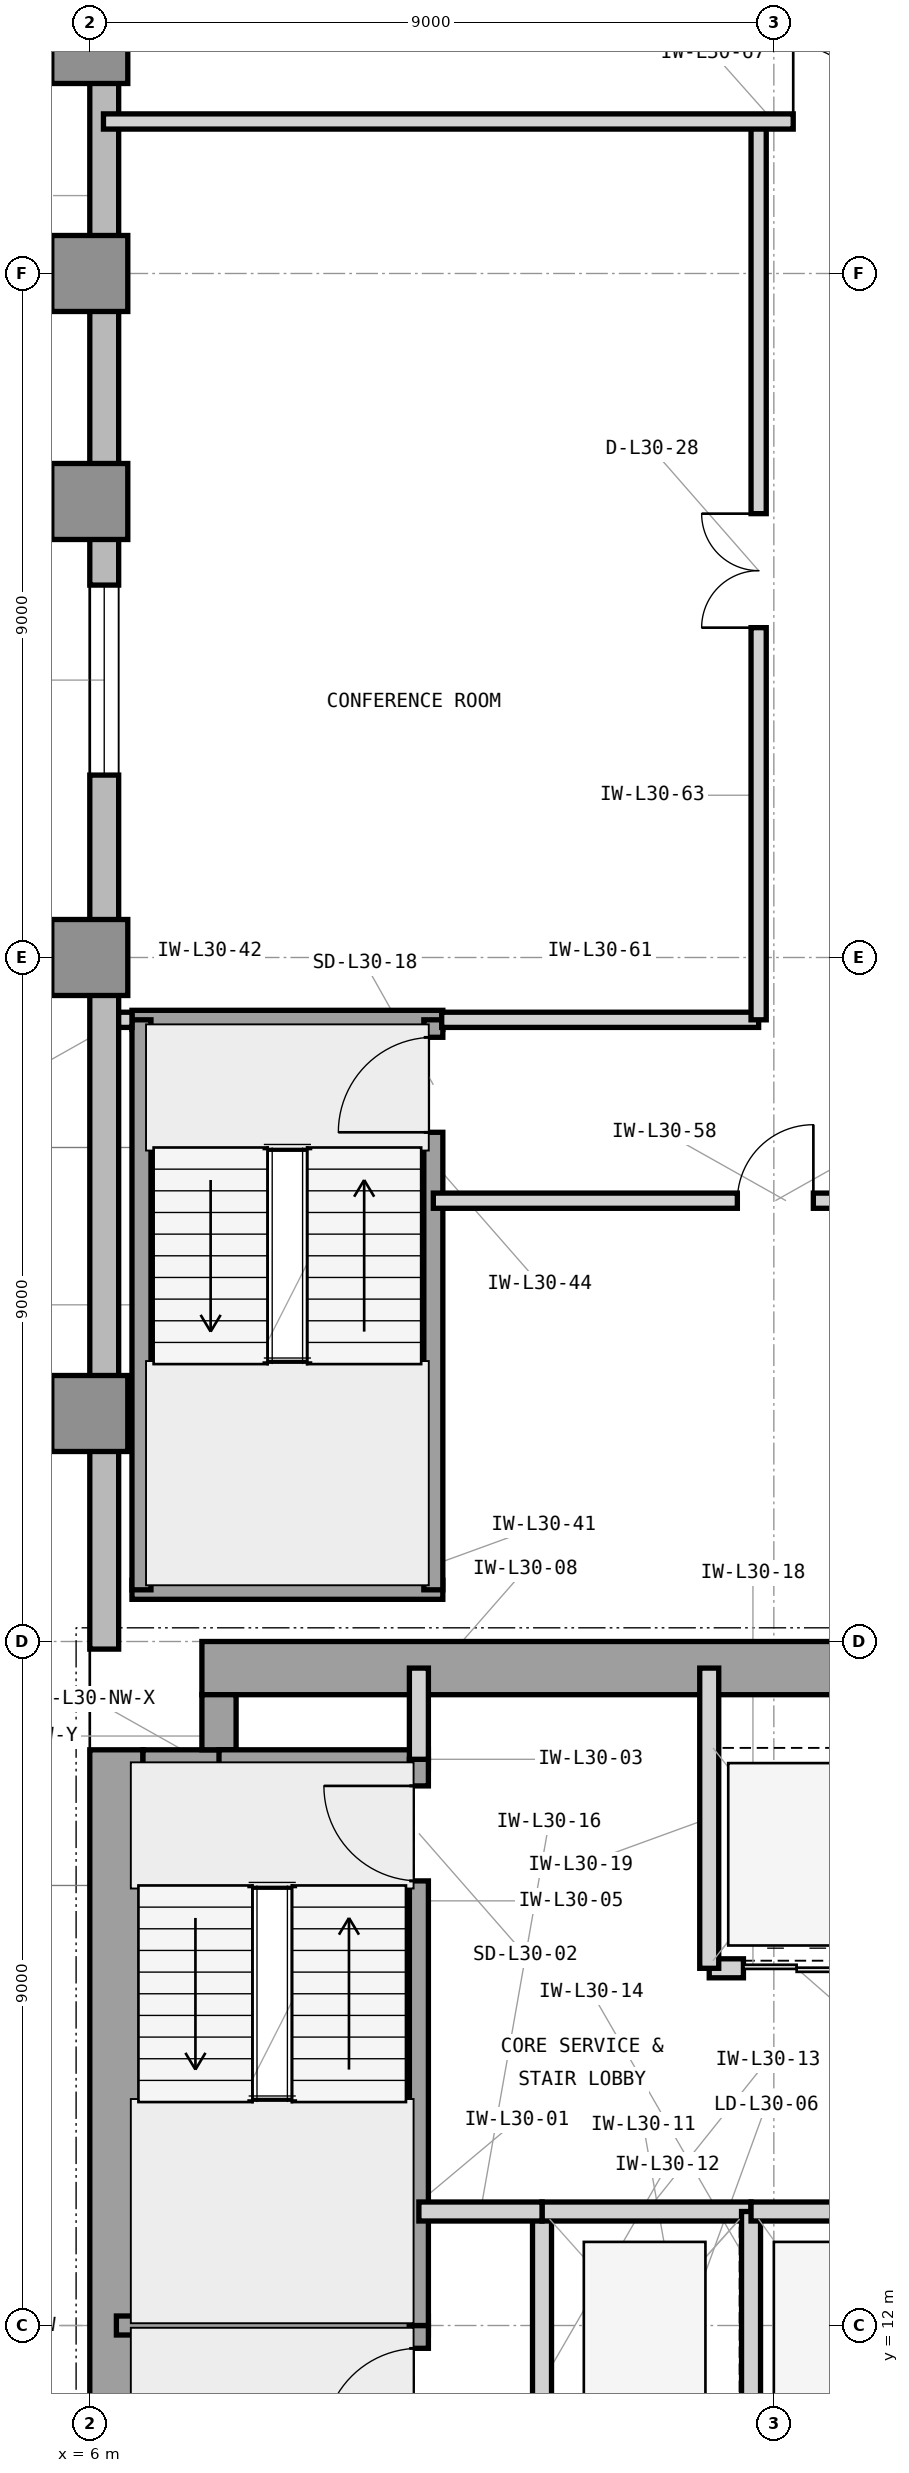
"""IFC4 building model, lengths in metres.
Left out: names, types, materials, properties, quantities, classifications, styles, units other than length and angle.
Written with IfcOpenShell. Run it as: python <this file> out.ifc"""

import sys

from ifc_helpers import new_model, si_unit, direction, frame, frame_2d, origin, origin_2d, place, context, subcontext, project, spatial, rectangle, extrude, element, fill, save


model = new_model("IFC4")
c1 = context("Model", 3, precision=1e-05, world=origin(), true_north=direction((0.0, 1.0)))
c2 = subcontext(c1, "Body", "Model", "MODEL_VIEW")
j1 = project(units=[si_unit("LENGTHUNIT", "METRE"), si_unit("PLANEANGLEUNIT", "RADIAN")], contexts=[c1])
p1 = place(None, origin())
s1 = spatial("IfcSite", under=j1, at=p1, CompositionType="ELEMENT")
p2 = place(p1, origin())
s2 = spatial("IfcBuilding", under=s1, at=p2, CompositionType="ELEMENT")
p3 = place(p2, frame((0.0, 0.0, 128.4)))
s3 = spatial("IfcBuildingStorey", under=s2, at=p3, CompositionType="ELEMENT", Elevation=128.4)
p4 = place(p3, frame((6.35, 4.425, 0.0), z_axis=(0.0, 0.0, 1.0), x_axis=(0.0, 1.0, 0.0)))
e1 = element("IfcWall", 1, at=p4, inside=s3, PredefinedType="SHEAR", context=c2, shape_type="SweptSolid", body=[
    extrude(rectangle(XDim=15.15, YDim=0.7, at=frame_2d((7.575, 0.0))), origin(), (0.0, 0.0, 1.0), 3.9),
])
p5 = place(p3, frame((7.475, 20.65, 0.0), z_axis=(0.0, 0.0, 1.0), x_axis=(1.0, 0.0, 0.0)))
e2 = element("IfcWall", 2, at=p5, inside=s3, PredefinedType="SHEAR", context=c2, shape_type="SweptSolid", body=[
    extrude(rectangle(XDim=12.325, YDim=0.7, at=frame_2d((6.163, 0.0))), origin(), (0.0, 0.0, 1.0), 3.9),
])
p6 = place(p3, frame((6.7, 19.35, 0.0), z_axis=(0.0, 0.0, 1.0), x_axis=(1.0, 0.0, 0.0)))
e3 = element("IfcWall", 3, at=p6, inside=s3, PredefinedType="SHEAR", context=c2, shape_type="SweptSolid", body=[
    extrude(rectangle(XDim=1.225, YDim=0.45, at=frame_2d((0.613, 0.0))), origin(), (0.0, 0.0, 1.0), 3.9),
])
p7 = place(p3, frame((7.7, 19.575, 0.0), z_axis=(0.0, 0.0, 1.0), x_axis=(0.0, 1.0, 0.0)))
e4 = element("IfcWall", 4, at=p7, inside=s3, PredefinedType="SHEAR", context=c2, shape_type="SweptSolid", body=[
    extrude(rectangle(XDim=0.725, YDim=0.45, at=frame_2d((0.363, 0.0))), origin(), (0.0, 0.0, 1.0), 3.9),
])
for number, where, z_axis, x_axis in (
    (5, (6.0, 24.0, 0.0), (0.0, 0.0, 1.0), (1.0, 0.0, 0.0)),
    (6, (6.0, 30.0, 0.0), (0.0, 0.0, 1.0), (1.0, 0.0, 0.0)),
    (7, (6.0, 36.0, 0.0), (0.0, 0.0, 1.0), (1.0, 0.0, 0.0)),
    (8, (6.0, 39.0, 0.0), (0.0, 0.0, 1.0), (1.0, 0.0, 0.0)),
    (9, (6.0, 42.0, 0.0), (0.0, 0.0, 1.0), (1.0, 0.0, 0.0)),
):
    element("IfcColumn", number, at=place(p3, frame(where, z_axis=z_axis, x_axis=x_axis)), inside=s3, PredefinedType="COLUMN", context=c2, shape_type="SweptSolid", body=[
        extrude(rectangle(XDim=1.0, YDim=1.0, at=origin_2d()), origin(), (0.0, 0.0, 1.0), 3.9),
    ])
p8 = place(p3, frame((6.19, 46.4, 0.0), z_axis=(0.0, 0.0, 1.0), x_axis=(0.0, -1.0, 0.0)))
e10 = element("IfcWall", 10, at=p8, inside=s3, PredefinedType="STANDARD", context=c2, shape_type="SweptSolid", body=[
    extrude(rectangle(XDim=25.5, YDim=0.38, at=frame_2d((12.75, 0.0))), origin(), (0.0, 0.0, 1.0), 3.7),
])
p9 = place(p8, frame((11.5, 0.0, 0.85)))
e11 = element("IfcOpeningElement", 11, at=p9, cuts=e10, PredefinedType="OPENING", context=c2, shape_type="SweptSolid", body=[
    extrude(rectangle(XDim=2.5, YDim=2.25, at=frame_2d((1.25, 1.125))), frame((0.0, 0.2, 0.0), z_axis=(0.0, -1.0, 0.0), x_axis=(1.0, 0.0, 0.0)), (0.0, 0.0, 1.0), 0.4),
])
p10 = place(p3, frame((6.35, 12.0, 0.0), z_axis=(0.0, 0.0, 1.0), x_axis=(1.0, 0.0, 0.0)))
e12 = element("IfcWall", 12, at=p10, inside=s3, PredefinedType="SHEAR", context=c2, shape_type="SweptSolid", body=[
    extrude(rectangle(XDim=4.105, YDim=0.25, at=frame_2d((2.052, 0.0))), origin(), (0.0, 0.0, 1.0), 3.9),
])
p11 = place(p3, frame((7.7, 19.45, 0.0), z_axis=(0.0, 0.0, 1.0), x_axis=(1.0, 0.0, 0.0)))
e13 = element("IfcWall", 13, at=p11, inside=s3, PredefinedType="SHEAR", context=c2, shape_type="SweptSolid", body=[
    extrude(rectangle(XDim=2.755, YDim=0.25, at=frame_2d((1.377, 0.0))), origin(), (0.0, 0.0, 1.0), 3.9),
])
p12 = place(p3, frame((10.33, 4.55, 0.0), z_axis=(0.0, 0.0, 1.0), x_axis=(0.0, 1.0, 0.0)))
e14 = element("IfcWall", 14, at=p12, inside=s3, PredefinedType="SHEAR", context=c2, shape_type="SweptSolid", body=[
    extrude(rectangle(XDim=7.45, YDim=0.25, at=frame_2d((3.725, 0.0))), origin(), (0.0, 0.0, 1.0), 3.9),
])
p13 = place(p12, frame((5.9, 0.0, 0.0)))
e15 = element("IfcOpeningElement", 15, at=p13, cuts=e14, PredefinedType="OPENING", context=c2, shape_type="SweptSolid", body=[
    extrude(rectangle(XDim=1.25, YDim=2.2, at=frame_2d((0.625, 1.1))), frame((0.0, 0.135, 0.0), z_axis=(0.0, -1.0, 0.0), x_axis=(1.0, 0.0, 0.0)), (0.0, 0.0, 1.0), 0.27),
])
p14 = place(p3, frame((10.33, 12.0, 0.0), z_axis=(0.0, 0.0, 1.0), x_axis=(0.0, 1.0, 0.0)))
e16 = element("IfcWall", 16, at=p14, inside=s3, PredefinedType="SHEAR", context=c2, shape_type="SweptSolid", body=[
    extrude(rectangle(XDim=7.45, YDim=0.25, at=frame_2d((3.725, 0.0))), origin(), (0.0, 0.0, 1.0), 3.9),
])
p15 = place(p14, frame((5.85, 0.0, 0.0)))
e17 = element("IfcOpeningElement", 17, at=p15, cuts=e16, PredefinedType="OPENING", context=c2, shape_type="SweptSolid", body=[
    extrude(rectangle(XDim=1.25, YDim=2.2, at=frame_2d((0.625, 1.1))), frame((0.0, 0.135, 0.0), z_axis=(0.0, -1.0, 0.0), x_axis=(1.0, 0.0, 0.0)), (0.0, 0.0, 1.0), 0.27),
])
p16 = place(p3, frame((10.33, 19.45, 0.0), z_axis=(0.0, 0.0, 1.0), x_axis=(0.0, 1.0, 0.0)))
e18 = element("IfcWall", 18, at=p16, inside=s3, PredefinedType="PARTITIONING", context=c2, shape_type="SweptSolid", body=[
    extrude(rectangle(XDim=1.2, YDim=0.25, at=frame_2d((0.6, 0.0))), origin(), (0.0, 0.0, 1.0), 2.994),
])
p17 = place(p3, frame((11.95, 10.5, 0.0), z_axis=(0.0, 0.0, 1.0), x_axis=(0.0, 1.0, 0.0)))
e19 = element("IfcWall", 19, at=p17, inside=s3, PredefinedType="PARTITIONING", context=c2, shape_type="SweptSolid", body=[
    extrude(rectangle(XDim=3.0, YDim=0.25, at=frame_2d((1.5, 0.0))), origin(), (0.0, 0.0, 1.0), 3.69),
])
p18 = place(p3, frame((11.95, 13.5, 0.0), z_axis=(0.0, 0.0, 1.0), x_axis=(1.0, 0.0, 0.0)))
e20 = element("IfcWall", 20, at=p18, inside=s3, PredefinedType="PARTITIONING", context=c2, shape_type="SweptSolid", body=[
    extrude(rectangle(XDim=2.75, YDim=0.25, at=frame_2d((1.375, 0.0))), origin(), (0.0, 0.0, 1.0), 3.233),
])
p19 = place(p3, frame((14.7, 10.5, 0.0), z_axis=(0.0, 0.0, 1.0), x_axis=(0.0, 1.0, 0.0)))
e21 = element("IfcWall", 21, at=p19, inside=s3, PredefinedType="PARTITIONING", context=c2, shape_type="SweptSolid", body=[
    extrude(rectangle(XDim=3.0, YDim=0.25, at=frame_2d((1.5, 0.0))), origin(), (0.0, 0.0, 1.0), 3.69),
])
p20 = place(p3, frame((10.33, 13.5, 0.0), z_axis=(0.0, 0.0, 1.0), x_axis=(1.0, 0.0, 0.0)))
e22 = element("IfcWall", 22, at=p20, inside=s3, PredefinedType="PARTITIONING", context=c2, shape_type="SweptSolid", body=[
    extrude(rectangle(XDim=1.62, YDim=0.25, at=frame_2d((0.81, 0.0))), origin(), (0.0, 0.0, 1.0), 3.233),
])
p21 = place(p3, frame((14.15, 16.7, 0.0), z_axis=(0.0, 0.0, 1.0), x_axis=(1.0, 0.0, 0.0)))
e23 = element("IfcWall", 23, at=p21, inside=s3, PredefinedType="PARTITIONING", context=c2, shape_type="SweptSolid", body=[
    extrude(rectangle(XDim=2.3, YDim=0.25, at=frame_2d((1.15, 0.0))), origin(), (0.0, 0.0, 1.0), 3.233),
])
p22 = place(p21, frame((0.45, 0.0, 0.0)))
e24 = element("IfcOpeningElement", 24, at=p22, cuts=e23, PredefinedType="OPENING", context=c2, shape_type="SweptSolid", body=[
    extrude(rectangle(XDim=1.4, YDim=2.35, at=frame_2d((0.7, 1.175))), frame((0.0, 0.135, 0.0), z_axis=(0.0, -1.0, 0.0), x_axis=(1.0, 0.0, 0.0)), (0.0, 0.0, 1.0), 0.27),
])
p23 = place(p3, frame((14.15, 16.7, 0.0), z_axis=(0.0, 0.0, 1.0), x_axis=(0.0, 1.0, 0.0)))
e25 = element("IfcWall", 25, at=p23, inside=s3, PredefinedType="PARTITIONING", context=c2, shape_type="SweptSolid", body=[
    extrude(rectangle(XDim=3.95, YDim=0.25, at=frame_2d((1.975, 0.0))), origin(), (0.0, 0.0, 1.0), 3.69),
])
p24 = place(p3, frame((14.7, 13.5, 0.0), z_axis=(0.0, 0.0, 1.0), x_axis=(1.0, 0.0, 0.0)))
e26 = element("IfcWall", 26, at=p24, inside=s3, PredefinedType="PARTITIONING", context=c2, shape_type="SweptSolid", body=[
    extrude(rectangle(XDim=8.95, YDim=0.25, at=frame_2d((4.475, 0.0))), origin(), (0.0, 0.0, 1.0), 3.233),
])
for number, where, z_axis, x_axis in (
    (27, (6.555, 21.68, 0.0), (0.0, 0.0, 1.0), (1.0, 0.0, 0.0)),
    (28, (6.555, 29.18, 0.0), (0.0, 0.0, 1.0), (1.0, 0.0, 0.0)),
):
    element("IfcWall", number, at=place(p3, frame(where, z_axis=z_axis, x_axis=x_axis)), inside=s3, PredefinedType="SHEAR", context=c2, shape_type="SweptSolid", body=[
        extrude(rectangle(XDim=4.09, YDim=0.25, at=frame_2d((2.045, 0.0))), origin(), (0.0, 0.0, 1.0), 3.9),
    ])
p25 = place(p3, frame((6.68, 21.68, 0.0), z_axis=(0.0, 0.0, 1.0), x_axis=(0.0, 1.0, 0.0)))
e29 = element("IfcWall", 29, at=p25, inside=s3, PredefinedType="SHEAR", context=c2, shape_type="SweptSolid", body=[
    extrude(rectangle(XDim=7.5, YDim=0.25, at=frame_2d((3.75, 0.0))), origin(), (0.0, 0.0, 1.0), 3.9),
])
p26 = place(p3, frame((10.52, 21.68, 0.0), z_axis=(0.0, 0.0, 1.0), x_axis=(0.0, 1.0, 0.0)))
e30 = element("IfcWall", 30, at=p26, inside=s3, PredefinedType="SHEAR", context=c2, shape_type="SweptSolid", body=[
    extrude(rectangle(XDim=7.5, YDim=0.25, at=frame_2d((3.75, 0.0))), origin(), (0.0, 0.0, 1.0), 3.9),
])
p27 = place(p26, frame((6.02, 0.0, 0.0)))
e31 = element("IfcOpeningElement", 31, at=p27, cuts=e30, PredefinedType="OPENING", context=c2, shape_type="SweptSolid", body=[
    extrude(rectangle(XDim=1.25, YDim=2.2, at=frame_2d((0.625, 1.1))), frame((0.0, 0.135, 0.0), z_axis=(0.0, -1.0, 0.0), x_axis=(1.0, 0.0, 0.0)), (0.0, 0.0, 1.0), 0.27),
])
p28 = place(p3, frame((10.52, 26.8, 0.0), z_axis=(0.0, 0.0, 1.0), x_axis=(1.0, 0.0, 0.0)))
e32 = element("IfcWall", 32, at=p28, inside=s3, PredefinedType="PARTITIONING", context=c2, shape_type="SweptSolid", body=[
    extrude(rectangle(XDim=9.28, YDim=0.2, at=frame_2d((4.64, 0.0))), origin(), (0.0, 0.0, 1.0), 3.69),
])
p29 = place(p28, frame((4.0, 0.0, 0.0)))
e33 = element("IfcOpeningElement", 33, at=p29, cuts=e32, PredefinedType="OPENING", context=c2, shape_type="SweptSolid", body=[
    extrude(rectangle(XDim=1.0, YDim=2.15, at=frame_2d((0.5, 1.075))), frame((0.0, 0.11, 0.0), z_axis=(0.0, -1.0, 0.0), x_axis=(1.0, 0.0, 0.0)), (0.0, 0.0, 1.0), 0.22),
])
p30 = place(p3, frame((6.38, 29.18, 0.0), z_axis=(0.0, 0.0, 1.0), x_axis=(1.0, 0.0, 0.0)))
e34 = element("IfcWall", 34, at=p30, inside=s3, PredefinedType="PARTITIONING", context=c2, shape_type="SweptSolid", body=[
    extrude(rectangle(XDim=0.175, YDim=0.2, at=frame_2d((0.087, 0.0))), origin(), (0.0, 0.0, 1.0), 3.69),
])
p31 = place(p3, frame((10.63, 29.18, 0.0), z_axis=(0.0, 0.0, 1.0), x_axis=(1.0, 0.0, 0.0)))
e35 = element("IfcWall", 35, at=p31, inside=s3, PredefinedType="PARTITIONING", context=c2, shape_type="SweptSolid", body=[
    extrude(rectangle(XDim=4.17, YDim=0.2, at=frame_2d((2.085, 0.0))), origin(), (0.0, 0.0, 1.0), 3.69),
])
p32 = place(p3, frame((14.8, 29.18, 0.0), z_axis=(0.0, 0.0, 1.0), x_axis=(0.0, 1.0, 0.0)))
e36 = element("IfcWall", 36, at=p32, inside=s3, PredefinedType="PARTITIONING", context=c2, shape_type="SweptSolid", body=[
    extrude(rectangle(XDim=11.82, YDim=0.2, at=frame_2d((5.91, 0.0))), origin(), (0.0, 0.0, 1.0), 3.69),
])
p33 = place(p32, frame((5.16, 0.0, 0.0)))
e37 = element("IfcOpeningElement", 37, at=p33, cuts=e36, PredefinedType="OPENING", context=c2, shape_type="SweptSolid", body=[
    extrude(rectangle(XDim=1.5, YDim=2.3, at=frame_2d((0.75, 1.15))), frame((0.0, 0.11, 0.0), z_axis=(0.0, -1.0, 0.0), x_axis=(1.0, 0.0, 0.0)), (0.0, 0.0, 1.0), 0.22),
])
p34 = place(p3, frame((6.18, 41.0, 0.0), z_axis=(0.0, 0.0, 1.0), x_axis=(1.0, 0.0, 0.0)))
e38 = element("IfcWall", 38, at=p34, inside=s3, PredefinedType="PARTITIONING", context=c2, shape_type="SweptSolid", body=[
    extrude(rectangle(XDim=17.64, YDim=0.2, at=frame_2d((8.82, 0.0))), origin(), (0.0, 0.0, 1.0), 3.69),
])
p35 = place(p34, frame((9.075, 0.0, 0.0)))
e39 = element("IfcOpeningElement", 39, at=p35, cuts=e38, PredefinedType="OPENING", context=c2, shape_type="SweptSolid", body=[
    extrude(rectangle(XDim=1.0, YDim=2.15, at=frame_2d((0.5, 1.075))), frame((0.0, 0.11, 0.0), z_axis=(0.0, -1.0, 0.0), x_axis=(1.0, 0.0, 0.0)), (0.0, 0.0, 1.0), 0.22),
])
p36 = place(p9, origin())
e40 = element("IfcWindow", 40, at=p36, inside=s3, PartitioningType="SINGLE_PANEL", PredefinedType="WINDOW", context=c2, shape_type="SweptSolid", body=[
    extrude(rectangle(XDim=2.5, YDim=2.25, at=frame_2d((1.25, 1.125))), frame((0.0, 0.11, 0.0), z_axis=(0.0, -1.0, 0.0), x_axis=(1.0, 0.0, 0.0)), (0.0, 0.0, 1.0), 0.06),
])
fill(e11, e40)
p37 = place(p13, origin())
e41 = element("IfcDoor", 41, at=p37, inside=s3, OperationType="SINGLE_SWING_LEFT", PredefinedType="DOOR", context=c2, shape_type="SweptSolid", body=[
    extrude(rectangle(XDim=1.25, YDim=2.2, at=frame_2d((0.625, 1.1))), frame((0.0, 0.025, 0.0), z_axis=(0.0, -1.0, 0.0), x_axis=(1.0, 0.0, 0.0)), (0.0, 0.0, 1.0), 0.05),
])
fill(e15, e41)
p38 = place(p15, origin())
e42 = element("IfcDoor", 42, at=p38, inside=s3, OperationType="SINGLE_SWING_RIGHT", PredefinedType="DOOR", context=c2, shape_type="SweptSolid", body=[
    extrude(rectangle(XDim=1.25, YDim=2.2, at=frame_2d((0.625, 1.1))), frame((0.0, 0.025, 0.0), z_axis=(0.0, -1.0, 0.0), x_axis=(1.0, 0.0, 0.0)), (0.0, 0.0, 1.0), 0.05),
])
fill(e17, e42)
p39 = place(p22, origin())
e43 = element("IfcDoor", 43, at=p39, inside=s3, OperationType="DOUBLE_DOOR_SLIDING", PredefinedType="DOOR", context=c2, shape_type="SweptSolid", body=[
    extrude(rectangle(XDim=1.4, YDim=2.35, at=frame_2d((0.7, 1.175))), frame((0.0, 0.025, 0.0), z_axis=(0.0, -1.0, 0.0), x_axis=(1.0, 0.0, 0.0)), (0.0, 0.0, 1.0), 0.05),
])
fill(e24, e43)
p40 = place(p27, origin())
e44 = element("IfcDoor", 44, at=p40, inside=s3, OperationType="SINGLE_SWING_LEFT", PredefinedType="DOOR", context=c2, shape_type="SweptSolid", body=[
    extrude(rectangle(XDim=1.25, YDim=2.2, at=frame_2d((0.625, 1.1))), frame((0.0, 0.025, 0.0), z_axis=(0.0, -1.0, 0.0), x_axis=(1.0, 0.0, 0.0)), (0.0, 0.0, 1.0), 0.05),
])
fill(e31, e44)
p41 = place(p29, origin())
e45 = element("IfcDoor", 45, at=p41, inside=s3, OperationType="SINGLE_SWING_RIGHT", PredefinedType="DOOR", context=c2, shape_type="SweptSolid", body=[
    extrude(rectangle(XDim=1.0, YDim=2.15, at=frame_2d((0.5, 1.075))), frame((0.0, 0.025, 0.0), z_axis=(0.0, -1.0, 0.0), x_axis=(1.0, 0.0, 0.0)), (0.0, 0.0, 1.0), 0.05),
])
fill(e33, e45)
p42 = place(p33, origin())
e46 = element("IfcDoor", 46, at=p42, inside=s3, OperationType="DOUBLE_DOOR_SINGLE_SWING", PredefinedType="DOOR", context=c2, shape_type="SweptSolid", body=[
    extrude(rectangle(XDim=1.5, YDim=2.3, at=frame_2d((0.75, 1.15))), frame((0.0, 0.025, 0.0), z_axis=(0.0, -1.0, 0.0), x_axis=(1.0, 0.0, 0.0)), (0.0, 0.0, 1.0), 0.05),
])
fill(e37, e46)
p43 = place(p35, origin())
e47 = element("IfcDoor", 47, at=p43, inside=s3, OperationType="SINGLE_SWING_LEFT", PredefinedType="DOOR", context=c2, shape_type="SweptSolid", body=[
    extrude(rectangle(XDim=1.0, YDim=2.15, at=frame_2d((0.5, 1.075))), frame((0.0, 0.025, 0.0), z_axis=(0.0, -1.0, 0.0), x_axis=(1.0, 0.0, 0.0)), (0.0, 0.0, 1.0), 0.05),
])
fill(e39, e47)
save(model, sys.argv[1])
